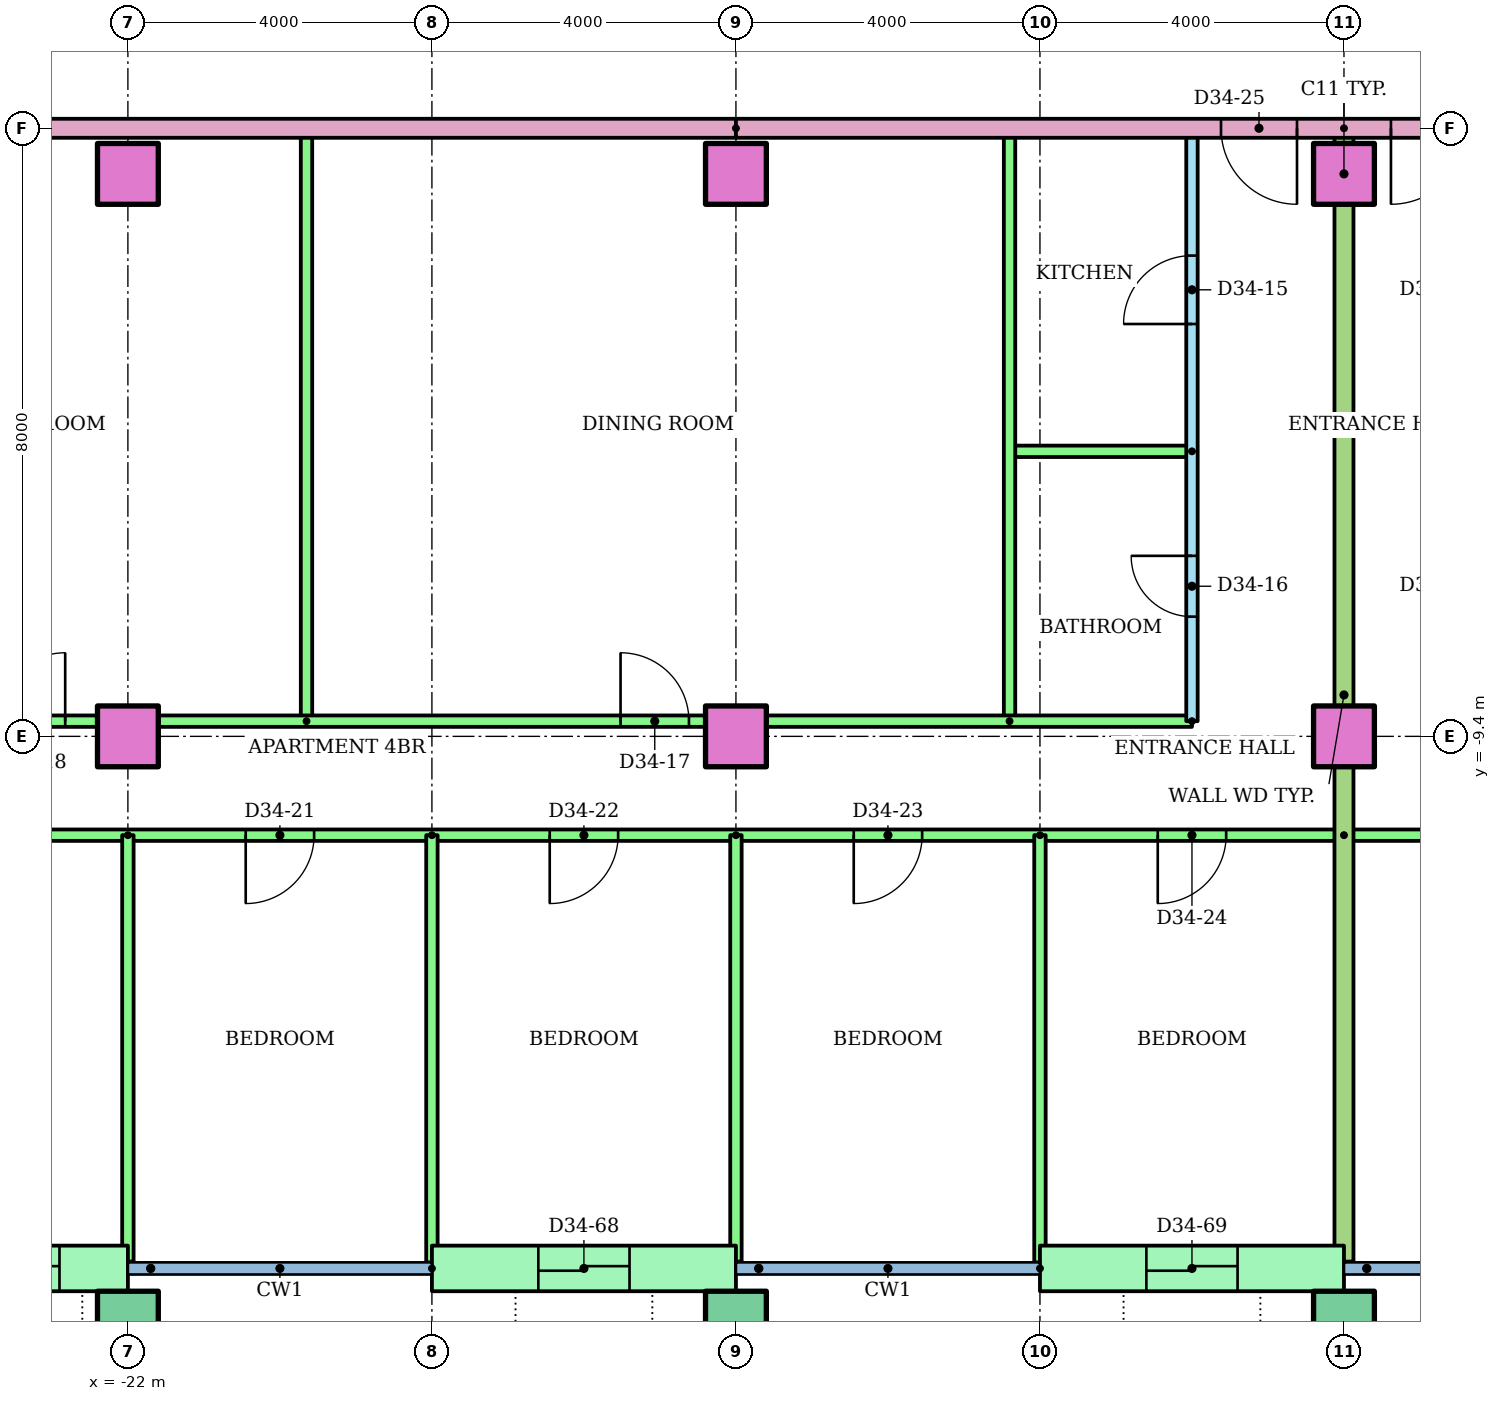
"""IFC4 building model, lengths in metres.
Left out: names, types, materials, properties, quantities, classifications, styles, units other than length and angle.
Written with IfcOpenShell. Run it as: python <this file> out.ifc"""

import sys

from ifc_helpers import new_model, si_unit, direction, frame, frame_2d, origin, origin_2d, place, context, subcontext, project, spatial, rectangle, hollow_rectangle, extrude, element, fill, save


model = new_model("IFC4")
c1 = context("Model", 3, precision=1e-05, world=origin(), true_north=direction((0.0, 1.0)))
c2 = subcontext(c1, "Body", "Model", "MODEL_VIEW")
j1 = project(units=[si_unit("LENGTHUNIT", "METRE"), si_unit("PLANEANGLEUNIT", "RADIAN")], contexts=[c1])
p1 = place(None, origin())
s1 = spatial("IfcSite", under=j1, at=p1, CompositionType="ELEMENT")
p2 = place(p1, origin())
s2 = spatial("IfcBuilding", under=s1, at=p2, CompositionType="ELEMENT")
p3 = place(p2, frame((0.0, 0.0, 132.6)))
s3 = spatial("IfcBuildingStorey", under=s2, at=p3, CompositionType="ELEMENT", Elevation=132.6)
for number, where in (
    (1, (-22.0, -17.1, 0.0)),
    (2, (-14.0, -17.1, 0.0)),
    (3, (-6.0, -17.1, 0.0)),
):
    element("IfcColumn", number, at=place(p3, frame(where)), inside=s3, PredefinedType="COLUMN", context=c2, shape_type="SweptSolid", body=[
        extrude(hollow_rectangle(XDim=0.8, YDim=0.8, WallThickness=0.04, at=origin_2d()), origin(), (0.0, 0.0, 1.0), 3.2),
    ])
for number, where in (
    (4, (-22.0, -9.4, 0.0)),
    (5, (-14.0, -9.4, 0.0)),
    (6, (-6.0, -9.4, 0.0)),
    (7, (-22.0, -2.0, 0.0)),
    (8, (-14.0, -2.0, 0.0)),
    (9, (-6.0, -2.0, 0.0)),
):
    element("IfcColumn", number, at=place(p3, frame(where)), inside=s3, PredefinedType="COLUMN", context=c2, shape_type="SweptSolid", body=[
        extrude(rectangle(XDim=0.8, YDim=0.8, at=origin_2d()), origin(), (0.0, 0.0, 1.0), 3.2),
    ])
p4 = place(p3, frame((-25.0, -16.4, 0.0)))
e10 = element("IfcWall", 10, at=p4, inside=s3, PredefinedType="STANDARD", context=c2, shape_type="SweptSolid", body=[
    extrude(rectangle(XDim=3.0, YDim=0.6, at=frame_2d((1.5, 0.0))), origin(), (0.0, 0.0, 1.0), 2.92),
])
p5 = place(p4, frame((0.9, 0.0, 0.0)))
e11 = element("IfcOpeningElement", 11, at=p5, cuts=e10, PredefinedType="OPENING", context=c2, shape_type="SweptSolid", body=[
    extrude(rectangle(XDim=1.2, YDim=2.1, at=frame_2d((0.6, 1.05))), frame((0.0, 0.31, 0.0), z_axis=(0.0, -1.0, 0.0), x_axis=(1.0, 0.0, 0.0)), (0.0, 0.0, 1.0), 0.62),
])
p6 = place(p3, frame((-18.0, -16.4, 0.0)))
e12 = element("IfcWall", 12, at=p6, inside=s3, PredefinedType="STANDARD", context=c2, shape_type="SweptSolid", body=[
    extrude(rectangle(XDim=4.0, YDim=0.6, at=frame_2d((2.0, 0.0))), origin(), (0.0, 0.0, 1.0), 2.92),
])
p7 = place(p6, frame((1.4, 0.0, 0.0)))
e13 = element("IfcOpeningElement", 13, at=p7, cuts=e12, PredefinedType="OPENING", context=c2, shape_type="SweptSolid", body=[
    extrude(rectangle(XDim=1.2, YDim=2.1, at=frame_2d((0.6, 1.05))), frame((0.0, 0.31, 0.0), z_axis=(0.0, -1.0, 0.0), x_axis=(1.0, 0.0, 0.0)), (0.0, 0.0, 1.0), 0.62),
])
p8 = place(p3, frame((-10.0, -16.4, 0.0)))
e14 = element("IfcWall", 14, at=p8, inside=s3, PredefinedType="STANDARD", context=c2, shape_type="SweptSolid", body=[
    extrude(rectangle(XDim=4.0, YDim=0.6, at=frame_2d((2.0, 0.0))), origin(), (0.0, 0.0, 1.0), 2.92),
])
p9 = place(p8, frame((1.4, 0.0, 0.0)))
e15 = element("IfcOpeningElement", 15, at=p9, cuts=e14, PredefinedType="OPENING", context=c2, shape_type="SweptSolid", body=[
    extrude(rectangle(XDim=1.2, YDim=2.1, at=frame_2d((0.6, 1.05))), frame((0.0, 0.31, 0.0), z_axis=(0.0, -1.0, 0.0), x_axis=(1.0, 0.0, 0.0)), (0.0, 0.0, 1.0), 0.62),
])
p10 = place(p3, frame((-8.0, -9.2, 0.0), z_axis=(0.0, 0.0, 1.0), x_axis=(0.0, 1.0, 0.0)))
e16 = element("IfcWall", 16, at=p10, inside=s3, PredefinedType="PARTITIONING", context=c2, shape_type="SweptSolid", body=[
    extrude(rectangle(XDim=7.8, YDim=0.15, at=frame_2d((3.9, 0.0))), origin(), (0.0, 0.0, 1.0), 2.4),
])
p11 = place(p10, frame((5.225, 0.0, 0.0)))
e17 = element("IfcOpeningElement", 17, at=p11, cuts=e16, PredefinedType="OPENING", context=c2, shape_type="SweptSolid", body=[
    extrude(rectangle(XDim=0.9, YDim=2.1, at=frame_2d((0.45, 1.05))), frame((0.0, 0.085, 0.0), z_axis=(0.0, -1.0, 0.0), x_axis=(1.0, 0.0, 0.0)), (0.0, 0.0, 1.0), 0.17),
])
p12 = place(p10, frame((1.375, 0.0, 0.0)))
e18 = element("IfcOpeningElement", 18, at=p12, cuts=e16, PredefinedType="OPENING", context=c2, shape_type="SweptSolid", body=[
    extrude(rectangle(XDim=0.8, YDim=2.1, at=frame_2d((0.4, 1.05))), frame((0.0, 0.085, 0.0), z_axis=(0.0, -1.0, 0.0), x_axis=(1.0, 0.0, 0.0)), (0.0, 0.0, 1.0), 0.17),
])
p13 = place(p3, frame((-8.0, -5.65, 0.0), z_axis=(0.0, 0.0, 1.0), x_axis=(-1.0, 0.0, 0.0)))
e19 = element("IfcWall", 19, at=p13, inside=s3, PredefinedType="PARTITIONING", context=c2, shape_type="SweptSolid", body=[
    extrude(rectangle(XDim=2.4, YDim=0.15, at=frame_2d((1.2, 0.0))), origin(), (0.0, 0.0, 1.0), 2.4),
])
for number, where, z_axis, x_axis in (
    (20, (-10.4, -9.2, 0.0), (0.0, 0.0, 1.0), (0.0, 1.0, 0.0)),
    (21, (-19.65, -9.2, 0.0), (0.0, 0.0, 1.0), (0.0, 1.0, 0.0)),
):
    element("IfcWall", number, at=place(p3, frame(where, z_axis=z_axis, x_axis=x_axis)), inside=s3, PredefinedType="PARTITIONING", context=c2, shape_type="SweptSolid", body=[
        extrude(rectangle(XDim=7.8, YDim=0.15, at=frame_2d((3.9, 0.0))), origin(), (0.0, 0.0, 1.0), 2.4),
    ])
p14 = place(p3, frame((-32.71, -9.2, 0.0)))
e22 = element("IfcWall", 22, at=p14, inside=s3, PredefinedType="PARTITIONING", context=c2, shape_type="SweptSolid", body=[
    extrude(rectangle(XDim=24.71, YDim=0.15, at=frame_2d((12.355, 0.0))), origin(), (0.0, 0.0, 1.0), 2.4),
])
p15 = place(p14, frame((17.192, 0.0, 0.0)))
e23 = element("IfcOpeningElement", 23, at=p15, cuts=e22, PredefinedType="OPENING", context=c2, shape_type="SweptSolid", body=[
    extrude(rectangle(XDim=0.9, YDim=2.1, at=frame_2d((0.45, 1.05))), frame((0.0, 0.085, 0.0), z_axis=(0.0, -1.0, 0.0), x_axis=(1.0, 0.0, 0.0)), (0.0, 0.0, 1.0), 0.17),
])
p16 = place(p14, frame((8.985, 0.0, 0.0)))
e24 = element("IfcOpeningElement", 24, at=p16, cuts=e22, PredefinedType="OPENING", context=c2, shape_type="SweptSolid", body=[
    extrude(rectangle(XDim=0.9, YDim=2.1, at=frame_2d((0.45, 1.05))), frame((0.0, 0.085, 0.0), z_axis=(0.0, -1.0, 0.0), x_axis=(1.0, 0.0, 0.0)), (0.0, 0.0, 1.0), 0.17),
])
p17 = place(p14, frame((3.328, 0.0, 0.0)))
e25 = element("IfcOpeningElement", 25, at=p17, cuts=e22, PredefinedType="OPENING", context=c2, shape_type="SweptSolid", body=[
    extrude(rectangle(XDim=0.9, YDim=2.1, at=frame_2d((0.45, 1.05))), frame((0.0, 0.085, 0.0), z_axis=(0.0, -1.0, 0.0), x_axis=(1.0, 0.0, 0.0)), (0.0, 0.0, 1.0), 0.17),
])
p18 = place(p3, frame((-6.0, -10.7, 0.0), z_axis=(0.0, 0.0, 1.0), x_axis=(-1.0, 0.0, 0.0)))
e26 = element("IfcWall", 26, at=p18, inside=s3, PredefinedType="PARTITIONING", context=c2, shape_type="SweptSolid", body=[
    extrude(rectangle(XDim=26.72, YDim=0.15, at=frame_2d((13.36, 0.0))), origin(), (0.0, 0.0, 1.0), 2.4),
])
p19 = place(p18, frame((20.75, 0.0, 0.0)))
e27 = element("IfcOpeningElement", 27, at=p19, cuts=e26, PredefinedType="OPENING", context=c2, shape_type="SweptSolid", body=[
    extrude(rectangle(XDim=1.0, YDim=2.1, at=frame_2d((0.5, 1.05))), frame((0.0, 0.085, 0.0), z_axis=(0.0, -1.0, 0.0), x_axis=(1.0, 0.0, 0.0)), (0.0, 0.0, 1.0), 0.17),
])
p20 = place(p18, frame((13.55, 0.0, 0.0)))
e28 = element("IfcOpeningElement", 28, at=p20, cuts=e26, PredefinedType="OPENING", context=c2, shape_type="SweptSolid", body=[
    extrude(rectangle(XDim=0.9, YDim=2.1, at=frame_2d((0.45, 1.05))), frame((0.0, 0.085, 0.0), z_axis=(0.0, -1.0, 0.0), x_axis=(1.0, 0.0, 0.0)), (0.0, 0.0, 1.0), 0.17),
])
p21 = place(p18, frame((9.55, 0.0, 0.0)))
e29 = element("IfcOpeningElement", 29, at=p21, cuts=e26, PredefinedType="OPENING", context=c2, shape_type="SweptSolid", body=[
    extrude(rectangle(XDim=0.9, YDim=2.1, at=frame_2d((0.45, 1.05))), frame((0.0, 0.085, 0.0), z_axis=(0.0, -1.0, 0.0), x_axis=(1.0, 0.0, 0.0)), (0.0, 0.0, 1.0), 0.17),
])
p22 = place(p18, frame((5.55, 0.0, 0.0)))
e30 = element("IfcOpeningElement", 30, at=p22, cuts=e26, PredefinedType="OPENING", context=c2, shape_type="SweptSolid", body=[
    extrude(rectangle(XDim=0.9, YDim=2.1, at=frame_2d((0.45, 1.05))), frame((0.0, 0.085, 0.0), z_axis=(0.0, -1.0, 0.0), x_axis=(1.0, 0.0, 0.0)), (0.0, 0.0, 1.0), 0.17),
])
p23 = place(p18, frame((1.55, 0.0, 0.0)))
e31 = element("IfcOpeningElement", 31, at=p23, cuts=e26, PredefinedType="OPENING", context=c2, shape_type="SweptSolid", body=[
    extrude(rectangle(XDim=0.9, YDim=2.1, at=frame_2d((0.45, 1.05))), frame((0.0, 0.085, 0.0), z_axis=(0.0, -1.0, 0.0), x_axis=(1.0, 0.0, 0.0)), (0.0, 0.0, 1.0), 0.17),
])
p24 = place(p3, frame((-22.0, -10.7, 0.0), z_axis=(0.0, 0.0, 1.0), x_axis=(0.0, -1.0, 0.0)))
e32 = element("IfcWall", 32, at=p24, inside=s3, PredefinedType="PARTITIONING", context=c2, shape_type="SweptSolid", body=[
    extrude(rectangle(XDim=5.61, YDim=0.15, at=frame_2d((2.805, 0.0))), origin(), (0.0, 0.0, 1.0), 2.4),
])
p25 = place(p3, frame((-18.0, -10.7, 0.0), z_axis=(0.0, 0.0, 1.0), x_axis=(0.0, -1.0, 0.0)))
e33 = element("IfcWall", 33, at=p25, inside=s3, PredefinedType="PARTITIONING", context=c2, shape_type="SweptSolid", body=[
    extrude(rectangle(XDim=5.621, YDim=0.15, at=frame_2d((2.811, 0.0))), origin(), (0.0, 0.0, 1.0), 2.4),
])
p26 = place(p3, frame((-14.0, -10.7, 0.0), z_axis=(0.0, 0.0, 1.0), x_axis=(0.0, -1.0, 0.0)))
e34 = element("IfcWall", 34, at=p26, inside=s3, PredefinedType="PARTITIONING", context=c2, shape_type="SweptSolid", body=[
    extrude(rectangle(XDim=5.61, YDim=0.15, at=frame_2d((2.805, 0.0))), origin(), (0.0, 0.0, 1.0), 2.4),
])
p27 = place(p3, frame((-10.0, -10.7, 0.0), z_axis=(0.0, 0.0, 1.0), x_axis=(0.0, -1.0, 0.0)))
e35 = element("IfcWall", 35, at=p27, inside=s3, PredefinedType="PARTITIONING", context=c2, shape_type="SweptSolid", body=[
    extrude(rectangle(XDim=5.621, YDim=0.15, at=frame_2d((2.811, 0.0))), origin(), (0.0, 0.0, 1.0), 2.4),
])
p28 = place(p3, frame((10.0, -10.7, 0.0), z_axis=(0.0, 0.0, 1.0), x_axis=(-1.0, 0.0, 0.0)))
e36 = element("IfcWall", 36, at=p28, inside=s3, PredefinedType="PARTITIONING", context=c2, shape_type="SweptSolid", body=[
    extrude(rectangle(XDim=16.0, YDim=0.15, at=frame_2d((8.0, 0.0))), origin(), (0.0, 0.0, 1.0), 2.4),
])
p29 = place(p28, frame((13.55, 0.0, 0.0)))
e37 = element("IfcOpeningElement", 37, at=p29, cuts=e36, PredefinedType="OPENING", context=c2, shape_type="SweptSolid", body=[
    extrude(rectangle(XDim=0.9, YDim=2.1, at=frame_2d((0.45, 1.05))), frame((0.0, 0.085, 0.0), z_axis=(0.0, -1.0, 0.0), x_axis=(1.0, 0.0, 0.0)), (0.0, 0.0, 1.0), 0.17),
])
p30 = place(p28, frame((9.55, 0.0, 0.0)))
e38 = element("IfcOpeningElement", 38, at=p30, cuts=e36, PredefinedType="OPENING", context=c2, shape_type="SweptSolid", body=[
    extrude(rectangle(XDim=0.9, YDim=2.1, at=frame_2d((0.45, 1.05))), frame((0.0, 0.085, 0.0), z_axis=(0.0, -1.0, 0.0), x_axis=(1.0, 0.0, 0.0)), (0.0, 0.0, 1.0), 0.17),
])
p31 = place(p28, frame((3.5, 0.0, 0.0)))
e39 = element("IfcOpeningElement", 39, at=p31, cuts=e36, PredefinedType="OPENING", context=c2, shape_type="SweptSolid", body=[
    extrude(rectangle(XDim=1.0, YDim=2.1, at=frame_2d((0.5, 1.05))), frame((0.0, 0.085, 0.0), z_axis=(0.0, -1.0, 0.0), x_axis=(1.0, 0.0, 0.0)), (0.0, 0.0, 1.0), 0.17),
])
p32 = place(p3, frame((-6.0, -1.4, 0.0), z_axis=(0.0, 0.0, 1.0), x_axis=(0.0, -1.0, 0.0)))
e40 = element("IfcWall", 40, at=p32, inside=s3, PredefinedType="PARTITIONING", context=c2, shape_type="SweptSolid", body=[
    extrude(rectangle(XDim=14.91, YDim=0.25, at=frame_2d((7.455, 0.0))), origin(), (0.0, 0.0, 1.0), 2.4),
])
p33 = place(p3, frame((-14.0, -1.4, 0.0), z_axis=(0.0, 0.0, 1.0), x_axis=(-1.0, 0.0, 0.0)))
e41 = element("IfcWall", 41, at=p33, inside=s3, PredefinedType="PARTITIONING", context=c2, shape_type="SweptSolid", body=[
    extrude(rectangle(XDim=15.0, YDim=0.25, at=frame_2d((7.5, 0.0))), origin(), (0.0, 0.0, 1.0), 2.4),
])
p34 = place(p3, frame((14.0, -1.4, 0.0), z_axis=(0.0, 0.0, 1.0), x_axis=(-1.0, 0.0, 0.0)))
e42 = element("IfcWall", 42, at=p34, inside=s3, PredefinedType="PARTITIONING", context=c2, shape_type="SweptSolid", body=[
    extrude(rectangle(XDim=28.0, YDim=0.25, at=frame_2d((14.0, 0.0))), origin(), (0.0, 0.0, 1.0), 2.4),
])
p35 = place(p34, frame((20.618, 0.0, 0.0)))
e43 = element("IfcOpeningElement", 43, at=p35, cuts=e42, PredefinedType="OPENING", context=c2, shape_type="SweptSolid", body=[
    extrude(rectangle(XDim=1.0, YDim=2.1, at=frame_2d((0.5, 1.05))), frame((0.0, 0.135, 0.0), z_axis=(0.0, -1.0, 0.0), x_axis=(1.0, 0.0, 0.0)), (0.0, 0.0, 1.0), 0.27),
])
p36 = place(p34, frame((18.382, 0.0, 0.0)))
e44 = element("IfcOpeningElement", 44, at=p36, cuts=e42, PredefinedType="OPENING", context=c2, shape_type="SweptSolid", body=[
    extrude(rectangle(XDim=1.0, YDim=2.1, at=frame_2d((0.5, 1.05))), frame((0.0, 0.135, 0.0), z_axis=(0.0, -1.0, 0.0), x_axis=(1.0, 0.0, 0.0)), (0.0, 0.0, 1.0), 0.27),
])
p37 = place(p34, frame((2.382, 0.0, 0.0)))
e45 = element("IfcOpeningElement", 45, at=p37, cuts=e42, PredefinedType="OPENING", context=c2, shape_type="SweptSolid", body=[
    extrude(rectangle(XDim=1.0, YDim=2.1, at=frame_2d((0.5, 1.05))), frame((0.0, 0.135, 0.0), z_axis=(0.0, -1.0, 0.0), x_axis=(1.0, 0.0, 0.0)), (0.0, 0.0, 1.0), 0.27),
])
p38 = place(p11, origin())
e46 = element("IfcDoor", 46, at=p38, inside=s3, OperationType="SINGLE_SWING_LEFT", PredefinedType="DOOR", context=c2, shape_type="SweptSolid", body=[
    extrude(rectangle(XDim=0.9, YDim=2.1, at=frame_2d((0.45, 1.05))), frame((0.0, 0.025, 0.0), z_axis=(0.0, -1.0, 0.0), x_axis=(1.0, 0.0, 0.0)), (0.0, 0.0, 1.0), 0.05),
])
fill(e17, e46)
p39 = place(p12, origin())
e47 = element("IfcDoor", 47, at=p39, inside=s3, OperationType="SINGLE_SWING_RIGHT", PredefinedType="DOOR", context=c2, shape_type="SweptSolid", body=[
    extrude(rectangle(XDim=0.8, YDim=2.1, at=frame_2d((0.4, 1.05))), frame((0.0, 0.025, 0.0), z_axis=(0.0, -1.0, 0.0), x_axis=(1.0, 0.0, 0.0)), (0.0, 0.0, 1.0), 0.05),
])
fill(e18, e47)
p40 = place(p15, origin())
e48 = element("IfcDoor", 48, at=p40, inside=s3, OperationType="SINGLE_SWING_LEFT", PredefinedType="DOOR", context=c2, shape_type="SweptSolid", body=[
    extrude(rectangle(XDim=0.9, YDim=2.1, at=frame_2d((0.45, 1.05))), frame((0.0, 0.025, 0.0), z_axis=(0.0, -1.0, 0.0), x_axis=(1.0, 0.0, 0.0)), (0.0, 0.0, 1.0), 0.05),
])
fill(e23, e48)
p41 = place(p16, origin())
e49 = element("IfcDoor", 49, at=p41, inside=s3, OperationType="SINGLE_SWING_RIGHT", PredefinedType="DOOR", context=c2, shape_type="SweptSolid", body=[
    extrude(rectangle(XDim=0.9, YDim=2.1, at=frame_2d((0.45, 1.05))), frame((0.0, 0.025, 0.0), z_axis=(0.0, -1.0, 0.0), x_axis=(1.0, 0.0, 0.0)), (0.0, 0.0, 1.0), 0.05),
])
fill(e24, e49)
p42 = place(p20, origin())
e50 = element("IfcDoor", 50, at=p42, inside=s3, OperationType="SINGLE_SWING_RIGHT", PredefinedType="DOOR", context=c2, shape_type="SweptSolid", body=[
    extrude(rectangle(XDim=0.9, YDim=2.1, at=frame_2d((0.45, 1.05))), frame((0.0, 0.025, 0.0), z_axis=(0.0, -1.0, 0.0), x_axis=(1.0, 0.0, 0.0)), (0.0, 0.0, 1.0), 0.05),
])
fill(e28, e50)
p43 = place(p21, origin())
e51 = element("IfcDoor", 51, at=p43, inside=s3, OperationType="SINGLE_SWING_RIGHT", PredefinedType="DOOR", context=c2, shape_type="SweptSolid", body=[
    extrude(rectangle(XDim=0.9, YDim=2.1, at=frame_2d((0.45, 1.05))), frame((0.0, 0.025, 0.0), z_axis=(0.0, -1.0, 0.0), x_axis=(1.0, 0.0, 0.0)), (0.0, 0.0, 1.0), 0.05),
])
fill(e29, e51)
p44 = place(p22, origin())
e52 = element("IfcDoor", 52, at=p44, inside=s3, OperationType="SINGLE_SWING_RIGHT", PredefinedType="DOOR", context=c2, shape_type="SweptSolid", body=[
    extrude(rectangle(XDim=0.9, YDim=2.1, at=frame_2d((0.45, 1.05))), frame((0.0, 0.025, 0.0), z_axis=(0.0, -1.0, 0.0), x_axis=(1.0, 0.0, 0.0)), (0.0, 0.0, 1.0), 0.05),
])
fill(e30, e52)
p45 = place(p23, origin())
e53 = element("IfcDoor", 53, at=p45, inside=s3, OperationType="SINGLE_SWING_RIGHT", PredefinedType="DOOR", context=c2, shape_type="SweptSolid", body=[
    extrude(rectangle(XDim=0.9, YDim=2.1, at=frame_2d((0.45, 1.05))), frame((0.0, 0.025, 0.0), z_axis=(0.0, -1.0, 0.0), x_axis=(1.0, 0.0, 0.0)), (0.0, 0.0, 1.0), 0.05),
])
fill(e31, e53)
p46 = place(p35, origin())
e54 = element("IfcDoor", 54, at=p46, inside=s3, OperationType="SINGLE_SWING_LEFT", PredefinedType="DOOR", context=c2, shape_type="SweptSolid", body=[
    extrude(rectangle(XDim=1.0, YDim=2.1, at=frame_2d((0.5, 1.05))), frame((0.0, 0.025, 0.0), z_axis=(0.0, -1.0, 0.0), x_axis=(1.0, 0.0, 0.0)), (0.0, 0.0, 1.0), 0.05),
])
fill(e43, e54)
p47 = place(p36, origin())
e55 = element("IfcDoor", 55, at=p47, inside=s3, OperationType="SINGLE_SWING_RIGHT", PredefinedType="DOOR", context=c2, shape_type="SweptSolid", body=[
    extrude(rectangle(XDim=1.0, YDim=2.1, at=frame_2d((0.5, 1.05))), frame((0.0, 0.025, 0.0), z_axis=(0.0, -1.0, 0.0), x_axis=(1.0, 0.0, 0.0)), (0.0, 0.0, 1.0), 0.05),
])
fill(e44, e55)
p48 = place(p5, origin())
e56 = element("IfcDoor", 56, at=p48, inside=s3, OperationType="SLIDING_TO_LEFT", PredefinedType="DOOR", context=c2, shape_type="SweptSolid", body=[
    extrude(rectangle(XDim=1.2, YDim=2.1, at=frame_2d((0.6, 1.05))), frame((0.0, 0.025, 0.0), z_axis=(0.0, -1.0, 0.0), x_axis=(1.0, 0.0, 0.0)), (0.0, 0.0, 1.0), 0.05),
])
fill(e11, e56)
p49 = place(p7, origin())
e57 = element("IfcDoor", 57, at=p49, inside=s3, OperationType="SLIDING_TO_LEFT", PredefinedType="DOOR", context=c2, shape_type="SweptSolid", body=[
    extrude(rectangle(XDim=1.2, YDim=2.1, at=frame_2d((0.6, 1.05))), frame((0.0, 0.025, 0.0), z_axis=(0.0, -1.0, 0.0), x_axis=(1.0, 0.0, 0.0)), (0.0, 0.0, 1.0), 0.05),
])
fill(e13, e57)
p50 = place(p9, origin())
e58 = element("IfcDoor", 58, at=p50, inside=s3, OperationType="SLIDING_TO_LEFT", PredefinedType="DOOR", context=c2, shape_type="SweptSolid", body=[
    extrude(rectangle(XDim=1.2, YDim=2.1, at=frame_2d((0.6, 1.05))), frame((0.0, 0.025, 0.0), z_axis=(0.0, -1.0, 0.0), x_axis=(1.0, 0.0, 0.0)), (0.0, 0.0, 1.0), 0.05),
])
fill(e15, e58)
save(model, sys.argv[1])
